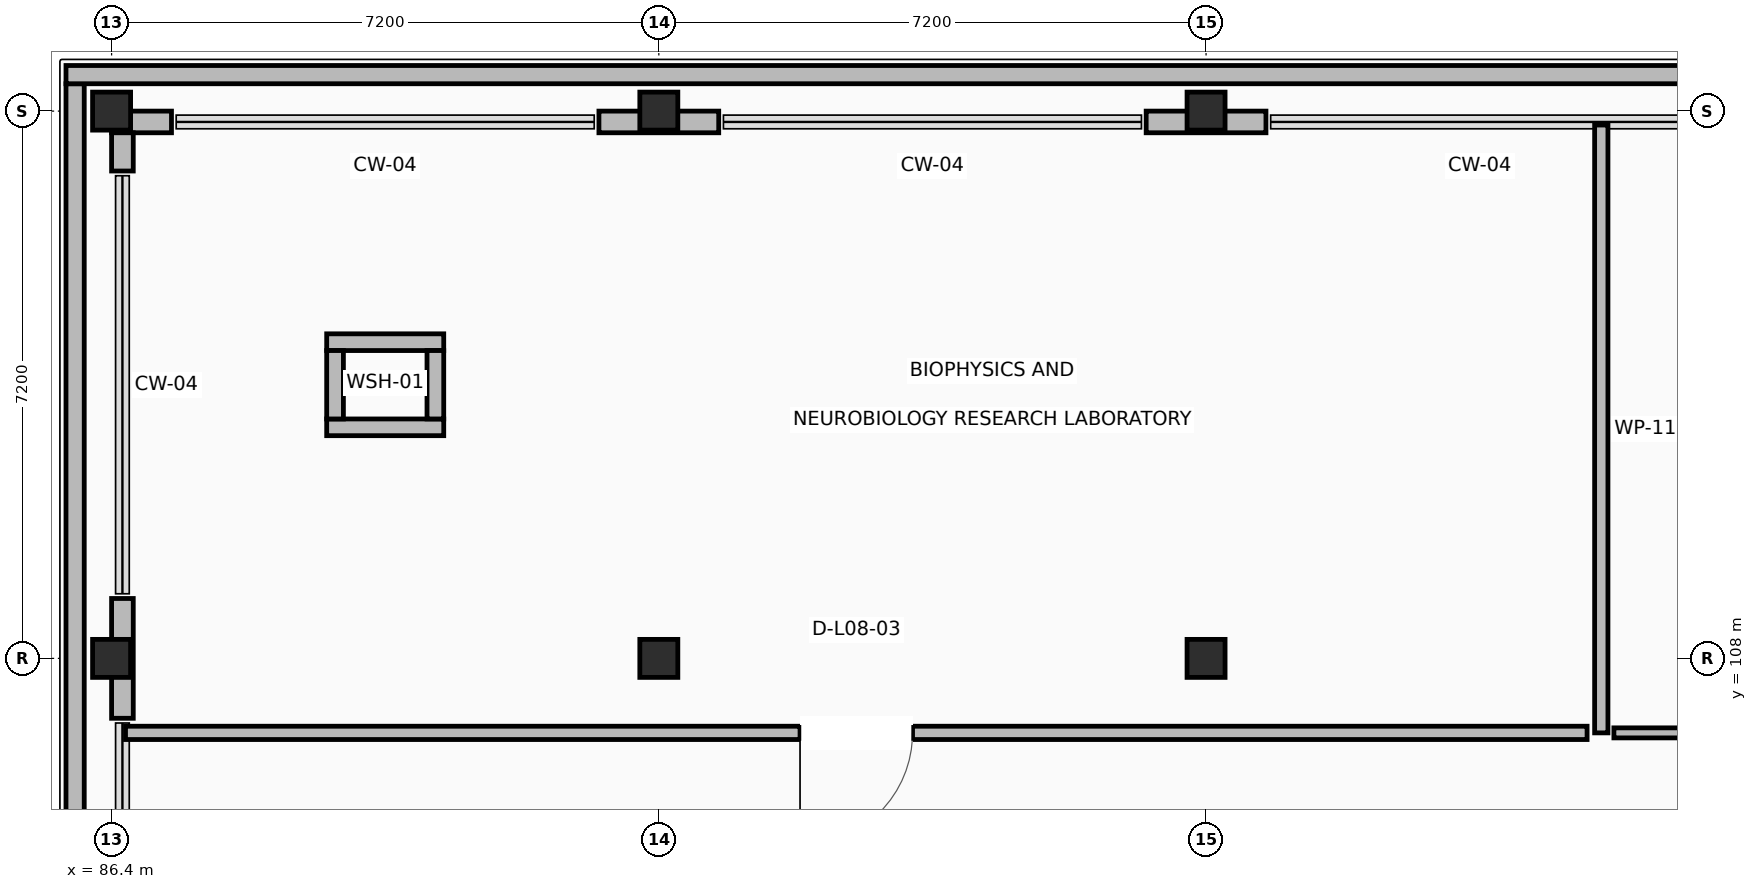
"""IFC4 building model, lengths in metres.
Left out: names, types, materials, properties, quantities, classifications, styles, units other than length and angle.
Written with IfcOpenShell. Run it as: python <this file> out.ifc"""

import sys

from ifc_helpers import new_model, si_unit, direction, frame, frame_2d, origin, origin_2d, place, context, subcontext, project, spatial, rectangle, extrude, element, fill, save


model = new_model("IFC4")
c1 = context("Model", 3, precision=1e-05, world=origin(), true_north=direction((0.0, 1.0)))
c2 = subcontext(c1, "Body", "Model", "MODEL_VIEW")
j1 = project(units=[si_unit("LENGTHUNIT", "METRE"), si_unit("PLANEANGLEUNIT", "RADIAN")], contexts=[c1])
p1 = place(None, origin())
s1 = spatial("IfcSite", under=j1, at=p1, CompositionType="ELEMENT")
p2 = place(p1, origin())
s2 = spatial("IfcBuilding", under=s1, at=p2, CompositionType="ELEMENT")
p3 = place(p2, frame((0.0, 0.0, 35.4)))
s3 = spatial("IfcBuildingStorey", under=s2, at=p3, CompositionType="ELEMENT", Elevation=35.4)
for number, where, z_axis, x_axis in (
    (1, (86.4, 108.0, 0.0), (0.0, 0.0, 1.0), (1.0, 0.0, 0.0)),
    (2, (86.4, 115.2, 0.0), (0.0, 0.0, 1.0), (1.0, 0.0, 0.0)),
    (3, (93.6, 108.0, 0.0), (0.0, 0.0, 1.0), (1.0, 0.0, 0.0)),
    (4, (93.6, 115.2, 0.0), (0.0, 0.0, 1.0), (1.0, 0.0, 0.0)),
    (5, (100.8, 108.0, 0.0), (0.0, 0.0, 1.0), (1.0, 0.0, 0.0)),
    (6, (100.8, 115.2, 0.0), (0.0, 0.0, 1.0), (1.0, 0.0, 0.0)),
):
    element("IfcColumn", number, at=place(p3, frame(where, z_axis=z_axis, x_axis=x_axis)), inside=s3, PredefinedType="COLUMN", context=c2, shape_type="SweptSolid", body=[
        extrude(rectangle(XDim=0.5, YDim=0.5, at=origin_2d()), origin(), (0.0, 0.0, 1.0), 3.92),
    ])
for number, where, z_axis, x_axis in (
    (7, (101.588, 115.058, 0.0), (0.0, 0.0, 1.0), (-1.0, 0.0, 0.0)),
    (8, (94.388, 115.058, 0.0), (0.0, 0.0, 1.0), (-1.0, 0.0, 0.0)),
):
    element("IfcWall", number, at=place(p3, frame(where, z_axis=z_axis, x_axis=x_axis)), inside=s3, PredefinedType="STANDARD", context=c2, shape_type="SweptSolid", body=[
        extrude(rectangle(XDim=1.576, YDim=0.285, at=frame_2d((0.788, 0.0))), origin(), (0.0, 0.0, 1.0), 2.96),
    ])
p4 = place(p3, frame((87.188, 115.058, 0.0), z_axis=(0.0, 0.0, 1.0), x_axis=(-1.0, 0.0, 0.0)))
e9 = element("IfcWall", 9, at=p4, inside=s3, PredefinedType="STANDARD", context=c2, shape_type="SweptSolid", body=[
    extrude(rectangle(XDim=0.788, YDim=0.285, at=frame_2d((0.394, 0.0))), origin(), (0.0, 0.0, 1.0), 2.96),
])
p5 = place(p3, frame((86.542, 114.915, 0.0), z_axis=(0.0, 0.0, 1.0), x_axis=(0.0, -1.0, 0.0)))
e10 = element("IfcWall", 10, at=p5, inside=s3, PredefinedType="STANDARD", context=c2, shape_type="SweptSolid", body=[
    extrude(rectangle(XDim=0.503, YDim=0.285, at=frame_2d((0.251, 0.0))), origin(), (0.0, 0.0, 1.0), 2.96),
])
p6 = place(p3, frame((86.542, 108.788, 0.0), z_axis=(0.0, 0.0, 1.0), x_axis=(0.0, -1.0, 0.0)))
e11 = element("IfcWall", 11, at=p6, inside=s3, PredefinedType="STANDARD", context=c2, shape_type="SweptSolid", body=[
    extrude(rectangle(XDim=1.576, YDim=0.285, at=frame_2d((0.788, 0.0))), origin(), (0.0, 0.0, 1.0), 2.96),
])
p7 = place(p3, frame((85.92, 93.24, 0.0), z_axis=(0.0, 0.0, 1.0), x_axis=(0.0, 1.0, 0.0)))
e12 = element("IfcWall", 12, at=p7, inside=s3, PredefinedType="PARAPET", context=c2, shape_type="SweptSolid", body=[
    extrude(rectangle(XDim=22.32, YDim=0.24, at=frame_2d((11.16, 0.0))), origin(), (0.0, 0.0, 1.0), 1.12),
])
p8 = place(p3, frame((85.8, 115.68, 0.0), z_axis=(0.0, 0.0, 1.0), x_axis=(1.0, 0.0, 0.0)))
e13 = element("IfcWall", 13, at=p8, inside=s3, PredefinedType="PARAPET", context=c2, shape_type="SweptSolid", body=[
    extrude(rectangle(XDim=66.0, YDim=0.24, at=frame_2d((33.0, 0.0))), origin(), (0.0, 0.0, 1.0), 1.12),
])
for number, where, z_axis, x_axis in (
    (14, (89.23, 111.04, 0.0), (0.0, 0.0, 1.0), (1.0, 0.0, 0.0)),
    (15, (89.23, 112.16, 0.0), (0.0, 0.0, 1.0), (1.0, 0.0, 0.0)),
):
    element("IfcWall", number, at=place(p3, frame(where, z_axis=z_axis, x_axis=x_axis)), inside=s3, PredefinedType="STANDARD", context=c2, shape_type="SweptSolid", body=[
        extrude(rectangle(XDim=1.54, YDim=0.22, at=frame_2d((0.77, 0.0))), origin(), (0.0, 0.0, 1.0), 2.96),
    ])
for number, where, z_axis, x_axis in (
    (16, (89.34, 111.15, 0.0), (0.0, 0.0, 1.0), (0.0, 1.0, 0.0)),
    (17, (90.66, 111.15, 0.0), (0.0, 0.0, 1.0), (0.0, 1.0, 0.0)),
):
    element("IfcWall", number, at=place(p3, frame(where, z_axis=z_axis, x_axis=x_axis)), inside=s3, PredefinedType="STANDARD", context=c2, shape_type="SweptSolid", body=[
        extrude(rectangle(XDim=0.9, YDim=0.22, at=frame_2d((0.45, 0.0))), origin(), (0.0, 0.0, 1.0), 2.96),
    ])
p9 = place(p3, frame((106.0, 115.017, 0.0), z_axis=(0.0, 0.0, 1.0), x_axis=(0.0, -1.0, 0.0)))
e18 = element("IfcWall", 18, at=p9, inside=s3, PredefinedType="PARTITIONING", context=c2, shape_type="SweptSolid", body=[
    extrude(rectangle(XDim=7.997, YDim=0.175, at=frame_2d((3.999, 0.0))), origin(), (0.0, 0.0, 1.0), 2.96),
])
p10 = place(p3, frame((105.813, 107.02, 0.0), z_axis=(0.0, 0.0, 1.0), x_axis=(-1.0, 0.0, 0.0)))
e19 = element("IfcWall", 19, at=p10, inside=s3, PredefinedType="PARTITIONING", context=c2, shape_type="SweptSolid", body=[
    extrude(rectangle(XDim=19.23, YDim=0.175, at=frame_2d((9.615, 0.0))), origin(), (0.0, 0.0, 1.0), 2.96),
])
p11 = place(p10, frame((8.875, 0.0, 0.0)))
e20 = element("IfcOpeningElement", 20, at=p11, cuts=e19, PredefinedType="OPENING", context=c2, shape_type="SweptSolid", body=[
    extrude(rectangle(XDim=1.48, YDim=2.2, at=frame_2d((0.74, 1.1))), frame((0.0, 0.097, 0.0), z_axis=(0.0, -1.0, 0.0), x_axis=(1.0, 0.0, 0.0)), (0.0, 0.0, 1.0), 0.195),
])
p12 = place(p3, frame((127.656, 107.02, 0.0), z_axis=(0.0, 0.0, 1.0), x_axis=(-1.0, 0.0, 0.0)))
e21 = element("IfcWall", 21, at=p12, inside=s3, PredefinedType="PARTITIONING", context=c2, shape_type="SweptSolid", body=[
    extrude(rectangle(XDim=21.49, YDim=0.132, at=frame_2d((10.745, 0.0))), origin(), (0.0, 0.0, 1.0), 2.96),
])
p13 = place(p12, frame((10.255, 0.0, 0.0)))
e22 = element("IfcOpeningElement", 22, at=p13, cuts=e21, PredefinedType="OPENING", context=c2, shape_type="SweptSolid", body=[
    extrude(rectangle(XDim=0.98, YDim=2.1, at=frame_2d((0.49, 1.05))), frame((0.0, 0.076, 0.0), z_axis=(0.0, -1.0, 0.0), x_axis=(1.0, 0.0, 0.0)), (0.0, 0.0, 1.0), 0.152),
])
p14 = place(p11, origin())
e23 = element("IfcDoor", 23, at=p14, inside=s3, OperationType="SINGLE_SWING_RIGHT", PredefinedType="DOOR", context=c2, shape_type="SweptSolid", body=[
    extrude(rectangle(XDim=1.48, YDim=2.2, at=frame_2d((0.74, 1.1))), frame((0.0, 0.025, 0.0), z_axis=(0.0, -1.0, 0.0), x_axis=(1.0, 0.0, 0.0)), (0.0, 0.0, 1.0), 0.05),
])
fill(e20, e23)
save(model, sys.argv[1])
